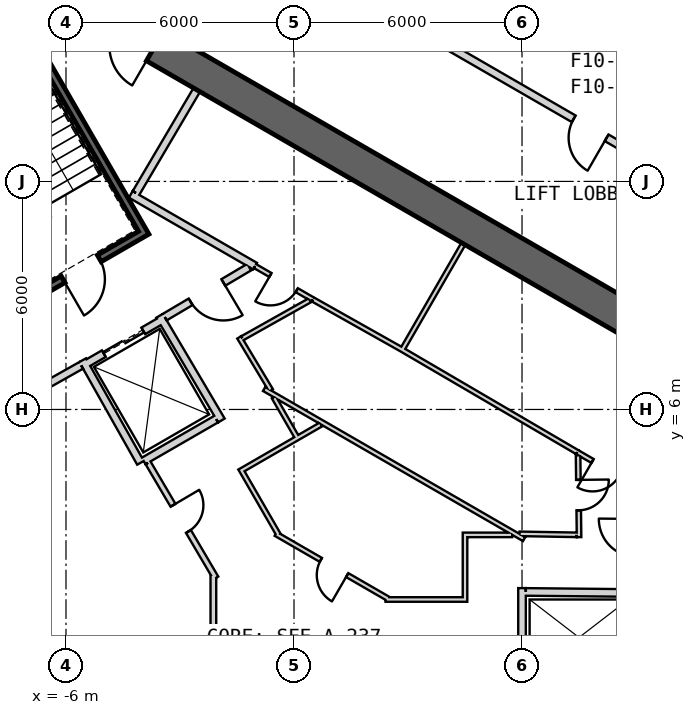
"""IFC4 building model, lengths in metres.
Left out: names, types, materials, properties, quantities, classifications, styles, units other than length and angle.
Written with IfcOpenShell. Run it as: python <this file> out.ifc"""

import sys

from ifc_helpers import new_model, si_unit, direction, frame, frame_2d, origin, place, context, subcontext, project, spatial, rectangle, extrude, element, fill, save


model = new_model("IFC4")
c1 = context("Model", 3, precision=1e-05, world=origin(), true_north=direction((0.0, 1.0)))
c2 = subcontext(c1, "Body", "Model", "MODEL_VIEW")
j1 = project(units=[si_unit("LENGTHUNIT", "METRE"), si_unit("PLANEANGLEUNIT", "RADIAN")], contexts=[c1])
p1 = place(None, origin())
s1 = spatial("IfcSite", under=j1, at=p1, CompositionType="ELEMENT")
p2 = place(p1, origin())
s2 = spatial("IfcBuilding", under=s1, at=p2, CompositionType="ELEMENT")
p3 = place(p2, frame((0.0, 0.0, 345.5)))
s3 = spatial("IfcBuildingStorey", under=s2, at=p3, CompositionType="ELEMENT", Elevation=345.5)
p4 = place(p3, frame((19.475, 2.208, 0.0), z_axis=(0.0, 0.0, 1.0), x_axis=(-0.866028369851, 0.499994862586, 0.0)))
e1 = element("IfcWall", 1, at=p4, inside=s3, PredefinedType="SHEAR", context=c2, shape_type="SweptSolid", body=[
    extrude(rectangle(XDim=31.523, YDim=0.9, at=frame_2d((15.762, 0.0))), origin(), (0.0, 0.0, 1.0), 3.9),
])
p5 = place(p4, frame((7.062, 0.0, 0.0)))
e2 = element("IfcOpeningElement", 2, at=p5, cuts=e1, PredefinedType="OPENING", context=c2, shape_type="SweptSolid", body=[
    extrude(rectangle(XDim=1.2, YDim=2.4, at=frame_2d((0.6, 1.2))), frame((0.0, 0.46, 0.0), z_axis=(0.0, -1.0, 0.0), x_axis=(1.0, 0.0, 0.0)), (0.0, 0.0, 1.0), 0.92),
])
p6 = place(p4, frame((3.612, 0.0, 0.0)))
e3 = element("IfcOpeningElement", 3, at=p6, cuts=e1, PredefinedType="OPENING", context=c2, shape_type="SweptSolid", body=[
    extrude(rectangle(XDim=1.2, YDim=2.4, at=frame_2d((0.6, 1.2))), frame((0.0, 0.46, 0.0), z_axis=(0.0, -1.0, 0.0), x_axis=(1.0, 0.0, 0.0)), (0.0, 0.0, 1.0), 0.92),
])
p7 = place(p4, frame((26.712, 0.0, 0.0)))
e4 = element("IfcOpeningElement", 4, at=p7, cuts=e1, PredefinedType="OPENING", context=c2, shape_type="SweptSolid", body=[
    extrude(rectangle(XDim=1.2, YDim=2.4, at=frame_2d((0.6, 1.2))), frame((0.0, 0.46, 0.0), z_axis=(0.0, -1.0, 0.0), x_axis=(1.0, 0.0, 0.0)), (0.0, 0.0, 1.0), 0.92),
])
p8 = place(p3, frame((6.0, -1.03, 0.0), z_axis=(0.0, 0.0, 1.0), x_axis=(0.0, 1.0, 0.0)))
e5 = element("IfcWall", 5, at=p8, inside=s3, PredefinedType="PLUMBINGWALL", context=c2, shape_type="SweptSolid", body=[
    extrude(rectangle(XDim=2.33, YDim=0.2, at=frame_2d((1.165, 0.0))), origin(), (0.0, 0.0, 1.0), 3.6),
])
p9 = place(p3, frame((9.1, 1.169, 0.0), z_axis=(0.0, 0.0, 1.0), x_axis=(-0.99994990606, 0.010009264196, 0.0)))
e6 = element("IfcWall", 6, at=p9, inside=s3, PredefinedType="PLUMBINGWALL", context=c2, shape_type="SweptSolid", body=[
    extrude(rectangle(XDim=3.0, YDim=0.2, at=frame_2d((1.5, 0.0))), origin(), (0.0, 0.0, 1.0), 3.6),
])
p10 = place(p3, frame((-7.854, 17.405, -0.3), z_axis=(0.0, 0.0, 1.0), x_axis=(0.499997992926, -0.866026562566, 0.0)))
e7 = element("IfcWall", 7, at=p10, inside=s3, PredefinedType="SHEAR", context=c2, shape_type="SweptSolid", body=[
    extrude(rectangle(XDim=7.9, YDim=0.2, at=frame_2d((3.95, 0.0))), origin(), (0.0, 0.0, 1.0), 3.9),
])
p11 = place(p3, frame((-7.159, 8.8, -0.3), z_axis=(0.0, 0.0, 1.0), x_axis=(0.866047807691, 0.499961193289, 0.0)))
e8 = element("IfcWall", 8, at=p11, inside=s3, PredefinedType="SHEAR", context=c2, shape_type="SweptSolid", body=[
    extrude(rectangle(XDim=3.6, YDim=0.2, at=frame_2d((1.8, 0.0))), origin(), (0.0, 0.0, 1.0), 3.9),
])
p12 = place(p11, frame((1.25, 0.0, 0.3)))
e9 = element("IfcOpeningElement", 9, at=p12, cuts=e8, PredefinedType="OPENING", context=c2, shape_type="SweptSolid", body=[
    extrude(rectangle(XDim=1.1, YDim=2.1, at=frame_2d((0.55, 1.05))), frame((0.0, 0.11, 0.0), z_axis=(0.0, -1.0, 0.0), x_axis=(1.0, 0.0, 0.0)), (0.0, 0.0, 1.0), 0.22),
])
p13 = place(p3, frame((-5.524, 7.168, 0.0), z_axis=(0.0, 0.0, 1.0), x_axis=(0.866024647952, 0.500001309137, 0.0)))
e10 = element("IfcWall", 10, at=p13, inside=s3, PredefinedType="PLUMBINGWALL", context=c2, shape_type="SweptSolid", body=[
    extrude(rectangle(XDim=2.4, YDim=0.2, at=frame_2d((1.2, 0.0))), origin(), (0.0, 0.0, 1.0), 3.6),
])
p14 = place(p13, frame((0.6, 0.0, 0.0)))
e11 = element("IfcOpeningElement", 11, at=p14, cuts=e10, PredefinedType="OPENING", context=c2, shape_type="SweptSolid", body=[
    extrude(rectangle(XDim=1.2, YDim=2.4, at=frame_2d((0.6, 1.2))), frame((0.0, 0.11, 0.0), z_axis=(0.0, -1.0, 0.0), x_axis=(1.0, 0.0, 0.0)), (0.0, 0.0, 1.0), 0.22),
])
p15 = place(p3, frame((-4.039, 4.596, 0.0), z_axis=(0.0, 0.0, 1.0), x_axis=(-0.491322718731, 0.870977603649, 0.0)))
e12 = element("IfcWall", 12, at=p15, inside=s3, PredefinedType="PLUMBINGWALL", context=c2, shape_type="SweptSolid", body=[
    extrude(rectangle(XDim=3.1, YDim=0.2, at=frame_2d((1.55, 0.0))), origin(), (0.0, 0.0, 1.0), 3.6),
])
p16 = place(p3, frame((-3.538, 8.465, 0.0), z_axis=(0.0, 0.0, 1.0), x_axis=(0.508616218331, -0.860993346345, 0.0)))
e13 = element("IfcWall", 13, at=p16, inside=s3, PredefinedType="PLUMBINGWALL", context=c2, shape_type="SweptSolid", body=[
    extrude(rectangle(XDim=3.2, YDim=0.2, at=frame_2d((1.6, 0.0))), origin(), (0.0, 0.0, 1.0), 3.6),
])
p17 = place(p3, frame((-2.047, 5.746, 0.0), z_axis=(0.0, 0.0, 1.0), x_axis=(-0.866019606374, -0.500010041276, 0.0)))
e14 = element("IfcWall", 14, at=p17, inside=s3, PredefinedType="PLUMBINGWALL", context=c2, shape_type="SweptSolid", body=[
    extrude(rectangle(XDim=2.205, YDim=0.2, at=frame_2d((1.102, 0.0))), origin(), (0.0, 0.0, 1.0), 3.6),
])
p18 = place(p3, frame((4.457, 10.359, 0.0), z_axis=(0.0, 0.0, 1.0), x_axis=(-0.500017246033, -0.866015446554, 0.0)))
e15 = element("IfcWall", 15, at=p18, inside=s3, PredefinedType="PARTITIONING", context=c2, shape_type="SweptSolid", body=[
    extrude(rectangle(XDim=3.25, YDim=0.12, at=frame_2d((1.625, 0.0))), origin(), (0.0, 0.0, 1.0), 3.6),
])
p19 = place(p3, frame((2.821, 7.586, 0.0), z_axis=(0.0, 0.0, 1.0), x_axis=(0.863262357411, -0.504755487615, 0.0)))
e16 = element("IfcWall", 16, at=p19, inside=s3, PredefinedType="PARTITIONING", context=c2, shape_type="SweptSolid", body=[
    extrude(rectangle(XDim=5.37, YDim=0.12, at=frame_2d((2.685, 0.0))), origin(), (0.0, 0.0, 1.0), 3.6),
])
p20 = place(p3, frame((-1.024, 9.771, 0.0), z_axis=(0.0, 0.0, 1.0), x_axis=(0.866039397417, -0.499975761534, 0.0)))
e17 = element("IfcWall", 17, at=p20, inside=s3, PredefinedType="PARTITIONING", context=c2, shape_type="SweptSolid", body=[
    extrude(rectangle(XDim=1.752, YDim=0.12, at=frame_2d((0.876, 0.0))), origin(), (0.0, 0.0, 1.0), 3.6),
])
p21 = place(p20, frame((0.466, 0.0, 0.0)))
e18 = element("IfcOpeningElement", 18, at=p21, cuts=e17, PredefinedType="OPENING", context=c2, shape_type="SweptSolid", body=[
    extrude(rectangle(XDim=0.8, YDim=2.1, at=frame_2d((0.4, 1.05))), frame((0.0, 0.07, 0.0), z_axis=(0.0, -1.0, 0.0), x_axis=(1.0, 0.0, 0.0)), (0.0, 0.0, 1.0), 0.14),
])
p22 = place(p3, frame((7.457, 4.875, 0.0), z_axis=(0.0, 0.0, 1.0), x_axis=(0.866027945518, -0.499995597562, 0.0)))
e19 = element("IfcWall", 19, at=p22, inside=s3, PredefinedType="PARTITIONING", context=c2, shape_type="SweptSolid", body=[
    extrude(rectangle(XDim=1.702, YDim=0.12, at=frame_2d((0.851, 0.0))), origin(), (0.0, 0.0, 1.0), 3.6),
])
p23 = place(p22, frame((0.461, 0.0, 0.0)))
e20 = element("IfcOpeningElement", 20, at=p23, cuts=e19, PredefinedType="OPENING", context=c2, shape_type="SweptSolid", body=[
    extrude(rectangle(XDim=0.8, YDim=2.1, at=frame_2d((0.4, 1.05))), frame((0.0, 0.07, 0.0), z_axis=(0.0, -1.0, 0.0), x_axis=(1.0, 0.0, 0.0)), (0.0, 0.0, 1.0), 0.14),
])
p24 = place(p3, frame((-4.296, 11.66, 0.0), z_axis=(0.0, 0.0, 1.0), x_axis=(0.866027389382, -0.499996560828, 0.0)))
e21 = element("IfcWall", 21, at=p24, inside=s3, PredefinedType="PARTITIONING", context=c2, shape_type="SweptSolid", body=[
    extrude(rectangle(XDim=3.778, YDim=0.2, at=frame_2d((1.889, 0.0))), origin(), (0.0, 0.0, 1.0), 3.6),
])
p25 = place(p3, frame((-2.558, 14.409, 0.0), z_axis=(0.0, 0.0, 1.0), x_axis=(-0.508018930956, -0.861345903683, 0.0)))
e22 = element("IfcWall", 22, at=p25, inside=s3, PredefinedType="PARTITIONING", context=c2, shape_type="SweptSolid", body=[
    extrude(rectangle(XDim=3.15, YDim=0.2, at=frame_2d((1.575, 0.0))), origin(), (0.0, 0.0, 1.0), 3.6),
])
p26 = place(p3, frame((0.494, 8.896, 0.0), z_axis=(0.0, 0.0, 1.0), x_axis=(0.871426548871, -0.490526013503, 0.0)))
e23 = element("IfcWall", 23, at=p26, inside=s3, PredefinedType="PARTITIONING", context=c2, shape_type="SweptSolid", body=[
    extrude(rectangle(XDim=2.67, YDim=0.12, at=frame_2d((1.335, 0.0))), origin(), (0.0, 0.0, 1.0), 3.6),
])
p27 = place(p3, frame((-5.6, 7.16, 0.0), z_axis=(0.0, 0.0, 1.0), x_axis=(-0.871340486379, -0.490678873396, 0.0)))
e24 = element("IfcWall", 24, at=p27, inside=s3, PredefinedType="PARTITIONING", context=c2, shape_type="SweptSolid", body=[
    extrude(rectangle(XDim=2.581, YDim=0.2, at=frame_2d((1.291, 0.0))), origin(), (0.0, 0.0, 1.0), 3.6),
])
p28 = place(p3, frame((-1.179, 9.745, 0.0), z_axis=(0.0, 0.0, 1.0), x_axis=(-0.860630814782, -0.509229418482, 0.0)))
e25 = element("IfcWall", 25, at=p28, inside=s3, PredefinedType="PARTITIONING", context=c2, shape_type="SweptSolid", body=[
    extrude(rectangle(XDim=2.582, YDim=0.2, at=frame_2d((1.291, 0.0))), origin(), (0.0, 0.0, 1.0), 3.6),
])
p29 = place(p28, frame((0.791, 0.0, 0.0)))
e26 = element("IfcOpeningElement", 26, at=p29, cuts=e25, PredefinedType="OPENING", context=c2, shape_type="SweptSolid", body=[
    extrude(rectangle(XDim=1.0, YDim=2.1, at=frame_2d((0.5, 1.05))), frame((0.0, 0.11, 0.0), z_axis=(0.0, -1.0, 0.0), x_axis=(1.0, 0.0, 0.0)), (0.0, 0.0, 1.0), 0.22),
])
p30 = place(p3, frame((-2.057, 1.565, 0.0), z_axis=(0.0, 0.0, 1.0), x_axis=(-0.507299271879, 0.861769951176, 0.0)))
e27 = element("IfcWall", 27, at=p30, inside=s3, PredefinedType="PLUMBINGWALL", context=c2, shape_type="SweptSolid", body=[
    extrude(rectangle(XDim=3.516, YDim=0.15, at=frame_2d((1.758, 0.0))), origin(), (0.0, 0.0, 1.0), 3.6),
])
p31 = place(p30, frame((1.422, 0.0, 0.0)))
e28 = element("IfcOpeningElement", 28, at=p31, cuts=e27, PredefinedType="OPENING", context=c2, shape_type="SweptSolid", body=[
    extrude(rectangle(XDim=0.8, YDim=2.1, at=frame_2d((0.4, 1.05))), frame((0.0, 0.085, 0.0), z_axis=(0.0, -1.0, 0.0), x_axis=(1.0, 0.0, 0.0)), (0.0, 0.0, 1.0), 0.17),
])
p32 = place(p3, frame((-2.122, -1.802, 0.0), z_axis=(0.0, 0.0, 1.0), x_axis=(0.0, 1.0, 0.0)))
e29 = element("IfcWall", 29, at=p32, inside=s3, PredefinedType="PLUMBINGWALL", context=c2, shape_type="SweptSolid", body=[
    extrude(rectangle(XDim=3.454, YDim=0.15, at=frame_2d((1.727, 0.0))), origin(), (0.0, 0.0, 1.0), 3.6),
])
p33 = place(p3, frame((-0.786, 6.538, 0.0), z_axis=(0.0, 0.0, 1.0), x_axis=(0.866034288228, -0.499984611377, 0.0)))
e30 = element("IfcWall", 30, at=p33, inside=s3, PredefinedType="PARTITIONING", context=c2, shape_type="SweptSolid", body=[
    extrude(rectangle(XDim=7.9, YDim=0.12, at=frame_2d((3.95, 0.0))), origin(), (0.0, 0.0, 1.0), 3.6),
])
p34 = place(p3, frame((4.44, 2.7, 0.0), z_axis=(0.0, 0.0, 1.0), x_axis=(1.0, 0.0, 0.0)))
e31 = element("IfcWall", 31, at=p34, inside=s3, PredefinedType="PARTITIONING", context=c2, shape_type="SweptSolid", body=[
    extrude(rectangle(XDim=1.302, YDim=0.12, at=frame_2d((0.651, 0.0))), origin(), (0.0, 0.0, 1.0), 3.6),
])
p35 = place(p3, frame((4.5, 0.94, 0.0), z_axis=(0.0, 0.0, 1.0), x_axis=(0.0, 1.0, 0.0)))
e32 = element("IfcWall", 32, at=p35, inside=s3, PredefinedType="PARTITIONING", context=c2, shape_type="SweptSolid", body=[
    extrude(rectangle(XDim=1.7, YDim=0.12, at=frame_2d((0.85, 0.0))), origin(), (0.0, 0.0, 1.0), 3.6),
])
p36 = place(p3, frame((2.407, 1.0, 0.0), z_axis=(0.0, 0.0, 1.0), x_axis=(1.0, 0.0, 0.0)))
e33 = element("IfcWall", 33, at=p36, inside=s3, PredefinedType="PARTITIONING", context=c2, shape_type="SweptSolid", body=[
    extrude(rectangle(XDim=2.032, YDim=0.12, at=frame_2d((1.016, 0.0))), origin(), (0.0, 0.0, 1.0), 3.6),
])
p37 = place(p3, frame((-0.48, 2.727, 0.0), z_axis=(0.0, 0.0, 1.0), x_axis=(0.86601279846, -0.500021832428, 0.0)))
e34 = element("IfcWall", 34, at=p37, inside=s3, PredefinedType="PARTITIONING", context=c2, shape_type="SweptSolid", body=[
    extrude(rectangle(XDim=3.435, YDim=0.12, at=frame_2d((1.718, 0.0))), origin(), (0.0, 0.0, 1.0), 3.6),
])
p38 = place(p37, frame((1.37, 0.0, 0.0)))
e35 = element("IfcOpeningElement", 35, at=p38, cuts=e34, PredefinedType="OPENING", context=c2, shape_type="SweptSolid", body=[
    extrude(rectangle(XDim=0.8, YDim=2.1, at=frame_2d((0.4, 1.05))), frame((0.0, 0.07, 0.0), z_axis=(0.0, -1.0, 0.0), x_axis=(1.0, 0.0, 0.0)), (0.0, 0.0, 1.0), 0.14),
])
p39 = place(p3, frame((-1.414, 4.449, 0.0), z_axis=(0.0, 0.0, 1.0), x_axis=(0.500097243556, -0.865969252911, 0.0)))
e36 = element("IfcWall", 36, at=p39, inside=s3, PredefinedType="PARTITIONING", context=c2, shape_type="SweptSolid", body=[
    extrude(rectangle(XDim=2.03, YDim=0.12, at=frame_2d((1.015, 0.0))), origin(), (0.0, 0.0, 1.0), 3.6),
])
p40 = place(p3, frame((0.709, 5.605, 0.0), z_axis=(0.0, 0.0, 1.0), x_axis=(-0.8660096254, -0.500027327967, 0.0)))
e37 = element("IfcWall", 37, at=p40, inside=s3, PredefinedType="PARTITIONING", context=c2, shape_type="SweptSolid", body=[
    extrude(rectangle(XDim=2.357, YDim=0.12, at=frame_2d((1.178, 0.0))), origin(), (0.0, 0.0, 1.0), 3.6),
])
p41 = place(p3, frame((-0.532, 6.322, 0.0), z_axis=(0.0, 0.0, 1.0), x_axis=(0.50005036918, -0.865996321171, 0.0)))
e38 = element("IfcWall", 38, at=p41, inside=s3, PredefinedType="PARTITIONING", context=c2, shape_type="SweptSolid", body=[
    extrude(rectangle(XDim=1.182, YDim=0.12, at=frame_2d((0.591, 0.0))), origin(), (0.0, 0.0, 1.0), 3.6),
])
p42 = place(p3, frame((-1.443, 7.897, 0.0), z_axis=(0.0, 0.0, 1.0), x_axis=(0.514937238613, -0.85722788119, 0.0)))
e39 = element("IfcWall", 39, at=p42, inside=s3, PredefinedType="PARTITIONING", context=c2, shape_type="SweptSolid", body=[
    extrude(rectangle(XDim=1.626, YDim=0.12, at=frame_2d((0.813, 0.0))), origin(), (0.0, 0.0, 1.0), 3.6),
])
p43 = place(p3, frame((0.414, 8.871, 0.0), z_axis=(0.0, 0.0, 1.0), x_axis=(-0.871809386997, -0.48984527429, 0.0)))
e40 = element("IfcWall", 40, at=p43, inside=s3, PredefinedType="PARTITIONING", context=c2, shape_type="SweptSolid", body=[
    extrude(rectangle(XDim=2.034, YDim=0.12, at=frame_2d((1.017, 0.0))), origin(), (0.0, 0.0, 1.0), 3.6),
])
p44 = place(p3, frame((7.501, 2.64, 0.0), z_axis=(0.0, 0.0, 1.0), x_axis=(-0.01178388431, 0.999930567625, 0.0)))
e41 = element("IfcWall", 41, at=p44, inside=s3, PredefinedType="PARTITIONING", context=c2, shape_type="SweptSolid", body=[
    extrude(rectangle(XDim=2.155, YDim=0.12, at=frame_2d((1.077, 0.0))), origin(), (0.0, 0.0, 1.0), 3.6),
])
p45 = place(p44, frame((0.707, 0.0, 0.0)))
e42 = element("IfcOpeningElement", 42, at=p45, cuts=e41, PredefinedType="OPENING", context=c2, shape_type="SweptSolid", body=[
    extrude(rectangle(XDim=0.8, YDim=2.1, at=frame_2d((0.4, 1.05))), frame((0.0, 0.07, 0.0), z_axis=(0.0, -1.0, 0.0), x_axis=(1.0, 0.0, 0.0)), (0.0, 0.0, 1.0), 0.14),
])
p46 = place(p3, frame((5.934, 2.727, 0.0), z_axis=(0.0, 0.0, 1.0), x_axis=(0.999846739959, -0.017507044085, 0.0)))
e43 = element("IfcWall", 43, at=p46, inside=s3, PredefinedType="PARTITIONING", context=c2, shape_type="SweptSolid", body=[
    extrude(rectangle(XDim=1.506, YDim=0.12, at=frame_2d((0.753, 0.0))), origin(), (0.0, 0.0, 1.0), 3.6),
])
p47 = place(p3, frame((22.074, 5.153, 0.0), z_axis=(0.0, 0.0, 1.0), x_axis=(-0.866023485483, 0.500003322581, 0.0)))
e44 = element("IfcWall", 44, at=p47, inside=s3, PredefinedType="PARTITIONING", context=c2, shape_type="SweptSolid", body=[
    extrude(rectangle(XDim=32.881, YDim=0.2, at=frame_2d((16.44, 0.0))), origin(), (0.0, 0.0, 1.0), 2.97),
])
p48 = place(p47, frame((15.99, 0.0, 0.0)))
e45 = element("IfcOpeningElement", 45, at=p48, cuts=e44, PredefinedType="OPENING", context=c2, shape_type="SweptSolid", body=[
    extrude(rectangle(XDim=1.0, YDim=2.1, at=frame_2d((0.5, 1.05))), frame((0.0, 0.11, 0.0), z_axis=(0.0, -1.0, 0.0), x_axis=(1.0, 0.0, 0.0)), (0.0, 0.0, 1.0), 0.22),
])
p49 = place(p12, origin())
e46 = element("IfcDoor", 46, at=p49, inside=s3, OperationType="SINGLE_SWING_LEFT", PredefinedType="USERDEFINED", context=c2, shape_type="SweptSolid", body=[
    extrude(rectangle(XDim=1.1, YDim=2.1, at=frame_2d((0.55, 1.05))), frame((0.0, 0.025, 0.0), z_axis=(0.0, -1.0, 0.0), x_axis=(1.0, 0.0, 0.0)), (0.0, 0.0, 1.0), 0.05),
])
fill(e9, e46)
p50 = place(p29, origin())
e47 = element("IfcDoor", 47, at=p50, inside=s3, OperationType="SINGLE_SWING_LEFT", PredefinedType="USERDEFINED", context=c2, shape_type="SweptSolid", body=[
    extrude(rectangle(XDim=1.0, YDim=2.1, at=frame_2d((0.5, 1.05))), frame((0.0, 0.025, 0.0), z_axis=(0.0, -1.0, 0.0), x_axis=(1.0, 0.0, 0.0)), (0.0, 0.0, 1.0), 0.05),
])
fill(e26, e47)
p51 = place(p14, origin())
e48 = element("IfcDoor", 48, at=p51, inside=s3, OperationType="SLIDING_TO_LEFT", PredefinedType="USERDEFINED", context=c2, shape_type="SweptSolid", body=[
    extrude(rectangle(XDim=1.2, YDim=2.4, at=frame_2d((0.6, 1.2))), frame((0.0, 0.025, 0.0), z_axis=(0.0, -1.0, 0.0), x_axis=(1.0, 0.0, 0.0)), (0.0, 0.0, 1.0), 0.05),
])
fill(e11, e48)
p52 = place(p31, origin())
e49 = element("IfcDoor", 49, at=p52, inside=s3, OperationType="SINGLE_SWING_RIGHT", PredefinedType="USERDEFINED", context=c2, shape_type="SweptSolid", body=[
    extrude(rectangle(XDim=0.8, YDim=2.1, at=frame_2d((0.4, 1.05))), frame((0.0, 0.025, 0.0), z_axis=(0.0, -1.0, 0.0), x_axis=(1.0, 0.0, 0.0)), (0.0, 0.0, 1.0), 0.05),
])
fill(e28, e49)
p53 = place(p38, origin())
e50 = element("IfcDoor", 50, at=p53, inside=s3, OperationType="SINGLE_SWING_RIGHT", PredefinedType="USERDEFINED", context=c2, shape_type="SweptSolid", body=[
    extrude(rectangle(XDim=0.8, YDim=2.1, at=frame_2d((0.4, 1.05))), frame((0.0, 0.025, 0.0), z_axis=(0.0, -1.0, 0.0), x_axis=(1.0, 0.0, 0.0)), (0.0, 0.0, 1.0), 0.05),
])
fill(e35, e50)
p54 = place(p45, origin())
e51 = element("IfcDoor", 51, at=p54, inside=s3, OperationType="SINGLE_SWING_LEFT", PredefinedType="USERDEFINED", context=c2, shape_type="SweptSolid", body=[
    extrude(rectangle(XDim=0.8, YDim=2.1, at=frame_2d((0.4, 1.05))), frame((0.0, 0.025, 0.0), z_axis=(0.0, -1.0, 0.0), x_axis=(1.0, 0.0, 0.0)), (0.0, 0.0, 1.0), 0.05),
])
fill(e42, e51)
p55 = place(p23, origin())
e52 = element("IfcDoor", 52, at=p55, inside=s3, OperationType="SINGLE_SWING_RIGHT", PredefinedType="USERDEFINED", context=c2, shape_type="SweptSolid", body=[
    extrude(rectangle(XDim=0.8, YDim=2.1, at=frame_2d((0.4, 1.05))), frame((0.0, 0.025, 0.0), z_axis=(0.0, -1.0, 0.0), x_axis=(1.0, 0.0, 0.0)), (0.0, 0.0, 1.0), 0.05),
])
fill(e20, e52)
p56 = place(p21, origin())
e53 = element("IfcDoor", 53, at=p56, inside=s3, OperationType="SINGLE_SWING_RIGHT", PredefinedType="USERDEFINED", context=c2, shape_type="SweptSolid", body=[
    extrude(rectangle(XDim=0.8, YDim=2.1, at=frame_2d((0.4, 1.05))), frame((0.0, 0.025, 0.0), z_axis=(0.0, -1.0, 0.0), x_axis=(1.0, 0.0, 0.0)), (0.0, 0.0, 1.0), 0.05),
])
fill(e18, e53)
p57 = place(p48, origin())
e54 = element("IfcDoor", 54, at=p57, inside=s3, OperationType="SINGLE_SWING_RIGHT", PredefinedType="USERDEFINED", context=c2, shape_type="SweptSolid", body=[
    extrude(rectangle(XDim=1.0, YDim=2.1, at=frame_2d((0.5, 1.05))), frame((0.0, 0.025, 0.0), z_axis=(0.0, -1.0, 0.0), x_axis=(1.0, 0.0, 0.0)), (0.0, 0.0, 1.0), 0.05),
])
fill(e45, e54)
save(model, sys.argv[1])
